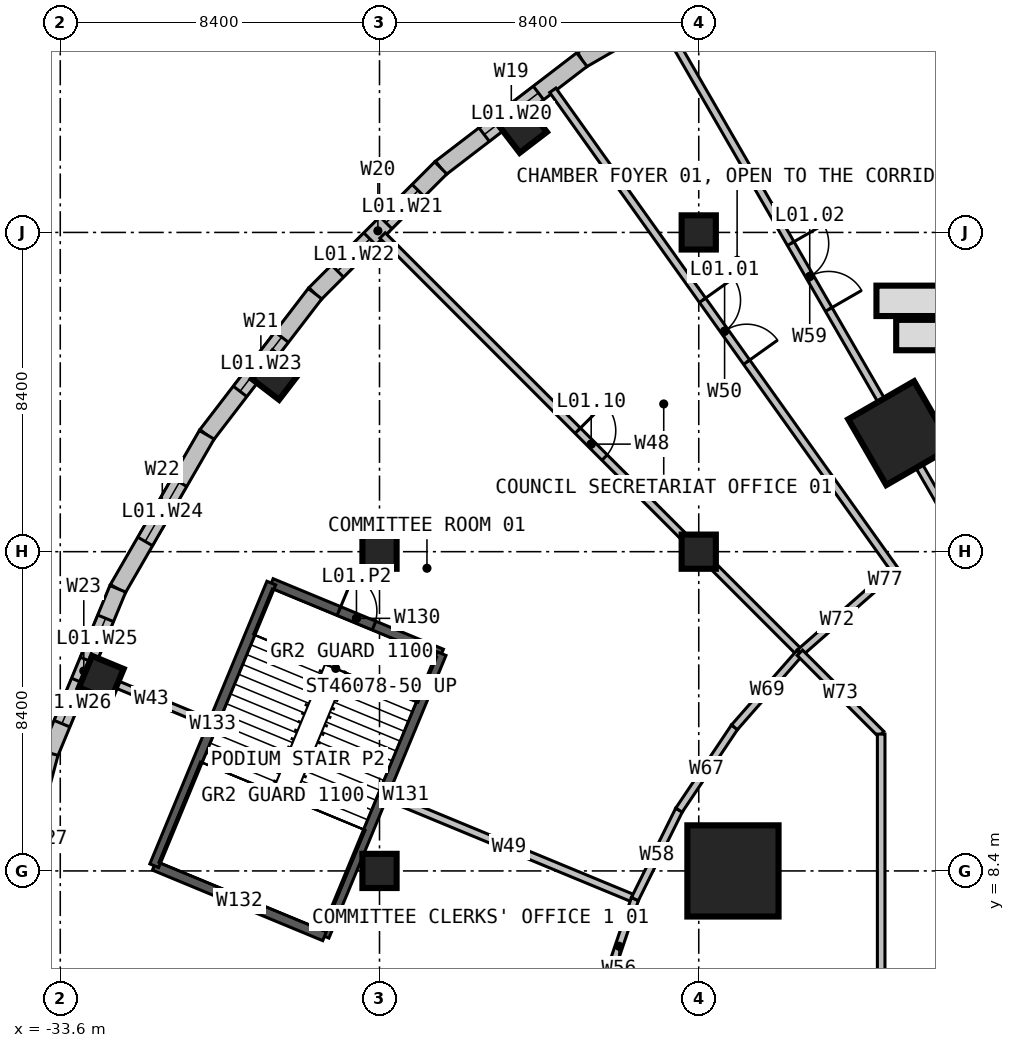
"""IFC4 building model, lengths in metres.
Left out: names, types, materials, properties, quantities, classifications, styles, units other than length and angle.
Written with IfcOpenShell. Run it as: python <this file> out.ifc"""

import sys

from ifc_helpers import new_model, si_unit, direction, frame, frame_2d, origin, origin_2d, place, context, subcontext, project, spatial, rectangle, hollow_rectangle, extrude, element, fill, save


model = new_model("IFC4")
c1 = context("Model", 3, precision=1e-05, world=origin(), true_north=direction((0.0, 1.0)))
c2 = subcontext(c1, "Body", "Model", "MODEL_VIEW")
j1 = project(units=[si_unit("LENGTHUNIT", "METRE"), si_unit("PLANEANGLEUNIT", "RADIAN")], contexts=[c1])
p1 = place(None, origin())
s1 = spatial("IfcSite", under=j1, at=p1, CompositionType="ELEMENT")
p2 = place(p1, origin())
s2 = spatial("IfcBuilding", under=s1, at=p2, CompositionType="ELEMENT")
p3 = place(p2, frame((0.0, 0.0, 6.0)))
s3 = spatial("IfcBuildingStorey", under=s2, at=p3, CompositionType="ELEMENT", Elevation=6.0)
for number, where, z_axis, x_axis in (
    (1, (-25.2, 8.4, 0.0), (0.0, 0.0, 1.0), (1.0, 0.0, 0.0)),
    (2, (-25.2, 16.8, 0.0), (0.0, 0.0, 1.0), (1.0, 0.0, 0.0)),
):
    element("IfcColumn", number, at=place(p3, frame(where, z_axis=z_axis, x_axis=x_axis)), inside=s3, PredefinedType="COLUMN", context=c2, shape_type="SweptSolid", body=[
        extrude(rectangle(XDim=0.9, YDim=0.9, at=origin_2d()), origin(), (0.0, 0.0, 1.0), 5.0),
    ])
p4 = place(p3, frame((-15.9, 8.4, 0.0), z_axis=(0.0, 0.0, 1.0), x_axis=(1.0, 0.0, 0.0)))
e3 = element("IfcColumn", 3, at=p4, inside=s3, PredefinedType="COLUMN", context=c2, shape_type="SweptSolid", body=[
    extrude(rectangle(XDim=2.4, YDim=2.4, at=origin_2d()), origin(), (0.0, 0.0, 1.0), 5.0),
])
for number, where, z_axis, x_axis in (
    (4, (-16.8, 16.8, 0.0), (0.0, 0.0, 1.0), (1.0, 0.0, 0.0)),
    (5, (-16.8, 25.2, 0.0), (0.0, 0.0, 1.0), (1.0, 0.0, 0.0)),
    (6, (-21.428, 27.926, 0.0), (0.0, 0.0, 1.0), (-0.609, 0.793, 0.0)),
    (7, (-27.926, 21.428, 0.0), (0.0, 0.0, 1.0), (-0.793, 0.609, 0.0)),
    (8, (-32.521, 13.47, 0.0), (0.0, 0.0, 1.0), (-0.924, 0.383, 0.0)),
):
    element("IfcColumn", number, at=place(p3, frame(where, z_axis=z_axis, x_axis=x_axis)), inside=s3, PredefinedType="COLUMN", context=c2, shape_type="SweptSolid", body=[
        extrude(rectangle(XDim=0.9, YDim=0.9, at=origin_2d()), origin(), (0.0, 0.0, 1.0), 5.0),
    ])
p5 = place(p3, frame((-11.5, 19.919, 0.0), z_axis=(0.0, 0.0, 1.0), x_axis=(-0.5, 0.866025403784, 0.0)))
e9 = element("IfcColumn", 9, at=p5, inside=s3, PredefinedType="COLUMN", context=c2, shape_type="SweptSolid", body=[
    extrude(hollow_rectangle(XDim=2.0, YDim=2.0, WallThickness=0.24, at=origin_2d()), origin(), (0.0, 0.0, 1.0), 5.0),
])
p6 = place(p3, frame((-15.823, 32.086, 0.0), z_axis=(0.0, 0.0, 1.0), x_axis=(-0.866012687223, -0.500022025083, 0.0)))
e10 = element("IfcWall", 10, at=p6, inside=s3, PredefinedType="SOLIDWALL", context=c2, shape_type="SweptSolid", body=[
    extrude(rectangle(XDim=4.679, YDim=0.45, at=frame_2d((2.34, 0.0))), origin(), (0.0, 0.0, 1.0), 4.7),
])
p7 = place(p6, frame((0.84, 0.0, 0.9)))
e11 = element("IfcOpeningElement", 11, at=p7, cuts=e10, PredefinedType="OPENING", context=c2, shape_type="SweptSolid", body=[
    extrude(rectangle(XDim=1.2, YDim=2.4, at=frame_2d((0.6, 1.2))), frame((0.0, 0.235, 0.0), z_axis=(0.0, -1.0, 0.0), x_axis=(1.0, 0.0, 0.0)), (0.0, 0.0, 1.0), 0.47),
])
p8 = place(p6, frame((2.64, 0.0, 0.9)))
e12 = element("IfcOpeningElement", 12, at=p8, cuts=e10, PredefinedType="OPENING", context=c2, shape_type="SweptSolid", body=[
    extrude(rectangle(XDim=1.2, YDim=2.4, at=frame_2d((0.6, 1.2))), frame((0.0, 0.235, 0.0), z_axis=(0.0, -1.0, 0.0), x_axis=(1.0, 0.0, 0.0)), (0.0, 0.0, 1.0), 0.47),
])
p9 = place(p3, frame((-19.875, 29.746, 0.0), z_axis=(0.0, 0.0, 1.0), x_axis=(-0.79334682721, -0.608769916927, 0.0)))
e13 = element("IfcWall", 13, at=p9, inside=s3, PredefinedType="SOLIDWALL", context=c2, shape_type="SweptSolid", body=[
    extrude(rectangle(XDim=4.68, YDim=0.45, at=frame_2d((2.34, 0.0))), origin(), (0.0, 0.0, 1.0), 4.7),
])
p10 = place(p9, frame((1.44, 0.0, 0.9)))
e14 = element("IfcOpeningElement", 14, at=p10, cuts=e13, PredefinedType="OPENING", context=c2, shape_type="SweptSolid", body=[
    extrude(rectangle(XDim=1.8, YDim=2.4, at=frame_2d((0.9, 1.2))), frame((0.0, 0.235, 0.0), z_axis=(0.0, -1.0, 0.0), x_axis=(1.0, 0.0, 0.0)), (0.0, 0.0, 1.0), 0.47),
])
p11 = place(p3, frame((-23.588, 26.897, 0.0), z_axis=(0.0, 0.0, 1.0), x_axis=(-0.707106781187, -0.707106781187, 0.0)))
e15 = element("IfcWall", 15, at=p11, inside=s3, PredefinedType="SOLIDWALL", context=c2, shape_type="SweptSolid", body=[
    extrude(rectangle(XDim=4.679, YDim=0.45, at=frame_2d((2.34, 0.0))), origin(), (0.0, 0.0, 1.0), 4.7),
])
p12 = place(p11, frame((0.84, 0.0, 0.9)))
e16 = element("IfcOpeningElement", 16, at=p12, cuts=e15, PredefinedType="OPENING", context=c2, shape_type="SweptSolid", body=[
    extrude(rectangle(XDim=1.2, YDim=2.4, at=frame_2d((0.6, 1.2))), frame((0.0, 0.235, 0.0), z_axis=(0.0, -1.0, 0.0), x_axis=(1.0, 0.0, 0.0)), (0.0, 0.0, 1.0), 0.47),
])
p13 = place(p11, frame((2.64, 0.0, 0.9)))
e17 = element("IfcOpeningElement", 17, at=p13, cuts=e15, PredefinedType="OPENING", context=c2, shape_type="SweptSolid", body=[
    extrude(rectangle(XDim=1.2, YDim=2.4, at=frame_2d((0.6, 1.2))), frame((0.0, 0.235, 0.0), z_axis=(0.0, -1.0, 0.0), x_axis=(1.0, 0.0, 0.0)), (0.0, 0.0, 1.0), 0.47),
])
p14 = place(p3, frame((-26.897, 23.588, 0.0), z_axis=(0.0, 0.0, 1.0), x_axis=(-0.608769916927, -0.79334682721, 0.0)))
e18 = element("IfcWall", 18, at=p14, inside=s3, PredefinedType="SOLIDWALL", context=c2, shape_type="SweptSolid", body=[
    extrude(rectangle(XDim=4.68, YDim=0.45, at=frame_2d((2.34, 0.0))), origin(), (0.0, 0.0, 1.0), 4.7),
])
p15 = place(p14, frame((1.44, 0.0, 0.9)))
e19 = element("IfcOpeningElement", 19, at=p15, cuts=e18, PredefinedType="OPENING", context=c2, shape_type="SweptSolid", body=[
    extrude(rectangle(XDim=1.8, YDim=2.4, at=frame_2d((0.9, 1.2))), frame((0.0, 0.235, 0.0), z_axis=(0.0, -1.0, 0.0), x_axis=(1.0, 0.0, 0.0)), (0.0, 0.0, 1.0), 0.47),
])
p16 = place(p3, frame((-29.746, 19.875, 0.0), z_axis=(0.0, 0.0, 1.0), x_axis=(-0.500022025083, -0.866012687223, 0.0)))
e20 = element("IfcWall", 20, at=p16, inside=s3, PredefinedType="SOLIDWALL", context=c2, shape_type="SweptSolid", body=[
    extrude(rectangle(XDim=4.679, YDim=0.45, at=frame_2d((2.34, 0.0))), origin(), (0.0, 0.0, 1.0), 4.7),
])
p17 = place(p16, frame((1.44, 0.0, 0.9)))
e21 = element("IfcOpeningElement", 21, at=p17, cuts=e20, PredefinedType="OPENING", context=c2, shape_type="SweptSolid", body=[
    extrude(rectangle(XDim=1.8, YDim=2.4, at=frame_2d((0.9, 1.2))), frame((0.0, 0.235, 0.0), z_axis=(0.0, -1.0, 0.0), x_axis=(1.0, 0.0, 0.0)), (0.0, 0.0, 1.0), 0.47),
])
p18 = place(p3, frame((-32.086, 15.823, 0.0), z_axis=(0.0, 0.0, 1.0), x_axis=(-0.382669718086, -0.923885213032, 0.0)))
e22 = element("IfcWall", 22, at=p18, inside=s3, PredefinedType="SOLIDWALL", context=c2, shape_type="SweptSolid", body=[
    extrude(rectangle(XDim=4.68, YDim=0.45, at=frame_2d((2.34, 0.0))), origin(), (0.0, 0.0, 1.0), 4.7),
])
p19 = place(p18, frame((0.84, 0.0, 0.9)))
e23 = element("IfcOpeningElement", 23, at=p19, cuts=e22, PredefinedType="OPENING", context=c2, shape_type="SweptSolid", body=[
    extrude(rectangle(XDim=1.2, YDim=2.4, at=frame_2d((0.6, 1.2))), frame((0.0, 0.235, 0.0), z_axis=(0.0, -1.0, 0.0), x_axis=(1.0, 0.0, 0.0)), (0.0, 0.0, 1.0), 0.47),
])
p20 = place(p18, frame((2.64, 0.0, 0.9)))
e24 = element("IfcOpeningElement", 24, at=p20, cuts=e22, PredefinedType="OPENING", context=c2, shape_type="SweptSolid", body=[
    extrude(rectangle(XDim=1.2, YDim=2.4, at=frame_2d((0.6, 1.2))), frame((0.0, 0.235, 0.0), z_axis=(0.0, -1.0, 0.0), x_axis=(1.0, 0.0, 0.0)), (0.0, 0.0, 1.0), 0.47),
])
p21 = place(p3, frame((-33.876, 11.5, 0.0), z_axis=(0.0, 0.0, 1.0), x_axis=(-0.258815185258, -0.965926860523, 0.0)))
e25 = element("IfcWall", 25, at=p21, inside=s3, PredefinedType="SOLIDWALL", context=c2, shape_type="SweptSolid", body=[
    extrude(rectangle(XDim=4.68, YDim=0.45, at=frame_2d((2.34, 0.0))), origin(), (0.0, 0.0, 1.0), 4.7),
])
p22 = place(p21, frame((1.44, 0.0, 0.9)))
e26 = element("IfcOpeningElement", 26, at=p22, cuts=e25, PredefinedType="OPENING", context=c2, shape_type="SweptSolid", body=[
    extrude(rectangle(XDim=1.8, YDim=2.4, at=frame_2d((0.9, 1.2))), frame((0.0, 0.235, 0.0), z_axis=(0.0, -1.0, 0.0), x_axis=(1.0, 0.0, 0.0)), (0.0, 0.0, 1.0), 0.47),
])
p23 = place(p3, frame((-28.047, 15.974, 0.0), z_axis=(0.0, 0.0, 1.0), x_axis=(0.923862828997, -0.382723755727, 0.0)))
e27 = element("IfcWall", 27, at=p23, inside=s3, PredefinedType="SOLIDWALL", context=c2, shape_type="SweptSolid", body=[
    extrude(rectangle(XDim=4.85, YDim=0.25, at=frame_2d((2.425, 0.0))), origin(), (0.0, 0.0, 1.0), 5.0),
])
p24 = place(p23, frame((1.925, 0.0, 0.0)))
e28 = element("IfcOpeningElement", 28, at=p24, cuts=e27, PredefinedType="OPENING", context=c2, shape_type="SweptSolid", body=[
    extrude(rectangle(XDim=1.0, YDim=2.2, at=frame_2d((0.5, 1.1))), frame((0.0, 0.135, 0.0), z_axis=(0.0, -1.0, 0.0), x_axis=(1.0, 0.0, 0.0)), (0.0, 0.0, 1.0), 0.27),
])
p25 = place(p3, frame((-23.566, 14.118, 0.0), z_axis=(0.0, 0.0, 1.0), x_axis=(-0.382689294869, -0.923877104161, 0.0)))
e29 = element("IfcWall", 29, at=p25, inside=s3, PredefinedType="SOLIDWALL", context=c2, shape_type="SweptSolid", body=[
    extrude(rectangle(XDim=8.05, YDim=0.25, at=frame_2d((4.025, 0.0))), origin(), (0.0, 0.0, 1.0), 5.0),
])
p26 = place(p3, frame((-26.647, 6.681, 0.0), z_axis=(0.0, 0.0, 1.0), x_axis=(-0.923880627248, 0.382680789426, 0.0)))
e30 = element("IfcWall", 30, at=p26, inside=s3, PredefinedType="SOLIDWALL", context=c2, shape_type="SweptSolid", body=[
    extrude(rectangle(XDim=4.85, YDim=0.25, at=frame_2d((2.425, 0.0))), origin(), (0.0, 0.0, 1.0), 5.0),
])
p27 = place(p3, frame((-31.127, 8.537, 0.0), z_axis=(0.0, 0.0, 1.0), x_axis=(0.382678572144, 0.923881545666, 0.0)))
e31 = element("IfcWall", 31, at=p27, inside=s3, PredefinedType="SOLIDWALL", context=c2, shape_type="SweptSolid", body=[
    extrude(rectangle(XDim=8.05, YDim=0.25, at=frame_2d((4.025, 0.0))), origin(), (0.0, 0.0, 1.0), 5.0),
])
p28 = place(p3, frame((-32.82, 13.6, 0.0), z_axis=(0.0, 0.0, 1.0), x_axis=(0.924077050269, -0.382206233813, 0.0)))
e32 = element("IfcWall", 32, at=p28, inside=s3, PredefinedType="PARTITIONING", context=c2, shape_type="SweptSolid", body=[
    extrude(rectangle(XDim=3.506, YDim=0.2, at=frame_2d((1.753, 0.0))), origin(), (0.0, 0.0, 1.0), 4.7),
])
p29 = place(p3, frame((-25.12, 25.12, 0.0), z_axis=(0.0, 0.0, 1.0), x_axis=(0.707106781187, -0.707106781187, 0.0)))
e33 = element("IfcWall", 33, at=p29, inside=s3, PredefinedType="PARTITIONING", context=c2, shape_type="SweptSolid", body=[
    extrude(rectangle(XDim=15.528, YDim=0.2, at=frame_2d((7.764, 0.0))), origin(), (0.0, 0.0, 1.0), 4.7),
])
p30 = place(p29, frame((7.264, 0.0, 0.0)))
e34 = element("IfcOpeningElement", 34, at=p30, cuts=e33, PredefinedType="OPENING", context=c2, shape_type="SweptSolid", body=[
    extrude(rectangle(XDim=1.0, YDim=2.2, at=frame_2d((0.5, 1.1))), frame((0.0, 0.11, 0.0), z_axis=(0.0, -1.0, 0.0), x_axis=(1.0, 0.0, 0.0)), (0.0, 0.0, 1.0), 0.22),
])
p31 = place(p3, frame((-25.1, 10.4, 0.0), z_axis=(0.0, 0.0, 1.0), x_axis=(0.923985694571, -0.382427033861, 0.0)))
e35 = element("IfcWall", 35, at=p31, inside=s3, PredefinedType="PARTITIONING", context=c2, shape_type="SweptSolid", body=[
    extrude(rectangle(XDim=7.165, YDim=0.2, at=frame_2d((3.583, 0.0))), origin(), (0.0, 0.0, 1.0), 4.7),
])
p32 = place(p3, frame((-20.64, 28.94, 0.0), z_axis=(0.0, 0.0, 1.0), x_axis=(0.580502370217, -0.814258557322, 0.0)))
e36 = element("IfcWall", 36, at=p32, inside=s3, PredefinedType="PARTITIONING", context=c2, shape_type="SweptSolid", body=[
    extrude(rectangle(XDim=15.572, YDim=0.2, at=frame_2d((7.786, 0.0))), origin(), (0.0, 0.0, 1.0), 4.7),
])
p33 = place(p32, frame((6.786, 0.0, 0.0)))
e37 = element("IfcOpeningElement", 37, at=p33, cuts=e36, PredefinedType="OPENING", context=c2, shape_type="SweptSolid", body=[
    extrude(rectangle(XDim=2.0, YDim=2.4, at=frame_2d((1.0, 1.2))), frame((0.0, 0.11, 0.0), z_axis=(0.0, -1.0, 0.0), x_axis=(1.0, 0.0, 0.0)), (0.0, 0.0, 1.0), 0.22),
])
p34 = place(p3, frame((-19.32, 5.18, 0.0), z_axis=(0.0, 0.0, 1.0), x_axis=(0.320839411875, 0.947133608203, 0.0)))
e38 = element("IfcWall", 38, at=p34, inside=s3, PredefinedType="PARTITIONING", context=c2, shape_type="SweptSolid", body=[
    extrude(rectangle(XDim=2.618, YDim=0.2, at=frame_2d((1.309, 0.0))), origin(), (0.0, 0.0, 1.0), 4.7),
])
p35 = place(p3, frame((-18.48, 7.66, 0.0), z_axis=(0.0, 0.0, 1.0), x_axis=(0.444107479291, 0.895973519049, 0.0)))
e39 = element("IfcWall", 39, at=p35, inside=s3, PredefinedType="PARTITIONING", context=c2, shape_type="SweptSolid", body=[
    extrude(rectangle(XDim=2.612, YDim=0.2, at=frame_2d((1.306, 0.0))), origin(), (0.0, 0.0, 1.0), 4.7),
])
p36 = place(p3, frame((-17.76, 30.76, 0.0), z_axis=(0.0, 0.0, 1.0), x_axis=(0.500022035744, -0.866012681068, 0.0)))
e40 = element("IfcWall", 40, at=p36, inside=s3, PredefinedType="PARTITIONING", context=c2, shape_type="SweptSolid", body=[
    extrude(rectangle(XDim=15.519, YDim=0.2, at=frame_2d((7.76, 0.0))), origin(), (0.0, 0.0, 1.0), 4.7),
])
p37 = place(p36, frame((6.76, 0.0, 0.0)))
e41 = element("IfcOpeningElement", 41, at=p37, cuts=e40, PredefinedType="OPENING", context=c2, shape_type="SweptSolid", body=[
    extrude(rectangle(XDim=2.0, YDim=2.4, at=frame_2d((1.0, 1.2))), frame((0.0, 0.11, 0.0), z_axis=(0.0, -1.0, 0.0), x_axis=(1.0, 0.0, 0.0)), (0.0, 0.0, 1.0), 0.22),
])
p38 = place(p3, frame((-17.32, 10.0, 0.0), z_axis=(0.0, 0.0, 1.0), x_axis=(0.556459812229, 0.83087452565, 0.0)))
e42 = element("IfcWall", 42, at=p38, inside=s3, PredefinedType="PARTITIONING", context=c2, shape_type="SweptSolid", body=[
    extrude(rectangle(XDim=2.624, YDim=0.2, at=frame_2d((1.312, 0.0))), origin(), (0.0, 0.0, 1.0), 4.7),
])
for number, where, z_axis, x_axis in (
    (43, (-15.86, 12.18, 0.0), (0.0, 0.0, 1.0), (0.66, 0.752, 0.0)),
    (44, (-14.14, 14.14, 0.0), (0.0, 0.0, 1.0), (0.752, 0.66, 0.0)),
):
    element("IfcWall", number, at=place(p3, frame(where, z_axis=z_axis, x_axis=x_axis)), inside=s3, PredefinedType="PARTITIONING", context=c2, shape_type="SweptSolid", body=[
        extrude(rectangle(XDim=2.608, YDim=0.2, at=frame_2d((1.304, 0.0))), origin(), (0.0, 0.0, 1.0), 4.7),
    ])
p39 = place(p3, frame((-14.14, 14.14, 0.0), z_axis=(0.0, 0.0, 1.0), x_axis=(0.707106781187, -0.707106781187, 0.0)))
e45 = element("IfcWall", 45, at=p39, inside=s3, PredefinedType="PARTITIONING", context=c2, shape_type="SweptSolid", body=[
    extrude(rectangle(XDim=3.026, YDim=0.2, at=frame_2d((1.513, 0.0))), origin(), (0.0, 0.0, 1.0), 4.7),
])
p40 = place(p3, frame((-12.18, 15.86, 0.0), z_axis=(0.0, 0.0, 1.0), x_axis=(0.823201613759, 0.567749155089, 0.0)))
e46 = element("IfcWall", 46, at=p40, inside=s3, PredefinedType="PARTITIONING", context=c2, shape_type="SweptSolid", body=[
    extrude(rectangle(XDim=0.704, YDim=0.2, at=frame_2d((0.352, 0.0))), origin(), (0.0, 0.0, 1.0), 4.7),
])
p41 = place(p3, frame((-12.0, 12.0, 0.0), z_axis=(0.0, 0.0, 1.0), x_axis=(0.0, -1.0, 0.0)))
e47 = element("IfcWall", 47, at=p41, inside=s3, PredefinedType="PARTITIONING", context=c2, shape_type="SweptSolid", body=[
    extrude(rectangle(XDim=24.0, YDim=0.2, at=frame_2d((12.0, 0.0))), origin(), (0.0, 0.0, 1.0), 4.7),
])
p42 = place(p10, origin())
e48 = element("IfcWindow", 48, at=p42, inside=s3, PartitioningType="SINGLE_PANEL", PredefinedType="WINDOW", context=c2, shape_type="SweptSolid", body=[
    extrude(rectangle(XDim=1.8, YDim=2.4, at=frame_2d((0.9, 1.2))), frame((0.0, 0.03, 0.0), z_axis=(0.0, -1.0, 0.0), x_axis=(1.0, 0.0, 0.0)), (0.0, 0.0, 1.0), 0.06),
])
fill(e14, e48)
p43 = place(p12, origin())
e49 = element("IfcWindow", 49, at=p43, inside=s3, PartitioningType="SINGLE_PANEL", PredefinedType="WINDOW", context=c2, shape_type="SweptSolid", body=[
    extrude(rectangle(XDim=1.2, YDim=2.4, at=frame_2d((0.6, 1.2))), frame((0.0, 0.03, 0.0), z_axis=(0.0, -1.0, 0.0), x_axis=(1.0, 0.0, 0.0)), (0.0, 0.0, 1.0), 0.06),
])
fill(e16, e49)
p44 = place(p13, origin())
e50 = element("IfcWindow", 50, at=p44, inside=s3, PartitioningType="SINGLE_PANEL", PredefinedType="WINDOW", context=c2, shape_type="SweptSolid", body=[
    extrude(rectangle(XDim=1.2, YDim=2.4, at=frame_2d((0.6, 1.2))), frame((0.0, 0.03, 0.0), z_axis=(0.0, -1.0, 0.0), x_axis=(1.0, 0.0, 0.0)), (0.0, 0.0, 1.0), 0.06),
])
fill(e17, e50)
p45 = place(p15, origin())
e51 = element("IfcWindow", 51, at=p45, inside=s3, PartitioningType="SINGLE_PANEL", PredefinedType="WINDOW", context=c2, shape_type="SweptSolid", body=[
    extrude(rectangle(XDim=1.8, YDim=2.4, at=frame_2d((0.9, 1.2))), frame((0.0, 0.03, 0.0), z_axis=(0.0, -1.0, 0.0), x_axis=(1.0, 0.0, 0.0)), (0.0, 0.0, 1.0), 0.06),
])
fill(e19, e51)
p46 = place(p17, origin())
e52 = element("IfcWindow", 52, at=p46, inside=s3, PartitioningType="SINGLE_PANEL", PredefinedType="WINDOW", context=c2, shape_type="SweptSolid", body=[
    extrude(rectangle(XDim=1.8, YDim=2.4, at=frame_2d((0.9, 1.2))), frame((0.0, 0.03, 0.0), z_axis=(0.0, -1.0, 0.0), x_axis=(1.0, 0.0, 0.0)), (0.0, 0.0, 1.0), 0.06),
])
fill(e21, e52)
p47 = place(p19, origin())
e53 = element("IfcWindow", 53, at=p47, inside=s3, PartitioningType="SINGLE_PANEL", PredefinedType="WINDOW", context=c2, shape_type="SweptSolid", body=[
    extrude(rectangle(XDim=1.2, YDim=2.4, at=frame_2d((0.6, 1.2))), frame((0.0, 0.03, 0.0), z_axis=(0.0, -1.0, 0.0), x_axis=(1.0, 0.0, 0.0)), (0.0, 0.0, 1.0), 0.06),
])
fill(e23, e53)
p48 = place(p20, origin())
e54 = element("IfcWindow", 54, at=p48, inside=s3, PartitioningType="SINGLE_PANEL", PredefinedType="WINDOW", context=c2, shape_type="SweptSolid", body=[
    extrude(rectangle(XDim=1.2, YDim=2.4, at=frame_2d((0.6, 1.2))), frame((0.0, 0.03, 0.0), z_axis=(0.0, -1.0, 0.0), x_axis=(1.0, 0.0, 0.0)), (0.0, 0.0, 1.0), 0.06),
])
fill(e24, e54)
p49 = place(p24, origin())
e55 = element("IfcDoor", 55, at=p49, inside=s3, OperationType="SINGLE_SWING_LEFT", PredefinedType="DOOR", context=c2, shape_type="SweptSolid", body=[
    extrude(rectangle(XDim=1.0, YDim=2.2, at=frame_2d((0.5, 1.1))), frame((0.0, 0.025, 0.0), z_axis=(0.0, -1.0, 0.0), x_axis=(1.0, 0.0, 0.0)), (0.0, 0.0, 1.0), 0.05),
])
fill(e28, e55)
p50 = place(p33, origin())
e56 = element("IfcDoor", 56, at=p50, inside=s3, OperationType="DOUBLE_DOOR_SINGLE_SWING", PredefinedType="DOOR", context=c2, shape_type="SweptSolid", body=[
    extrude(rectangle(XDim=2.0, YDim=2.4, at=frame_2d((1.0, 1.2))), frame((0.0, 0.025, 0.0), z_axis=(0.0, -1.0, 0.0), x_axis=(1.0, 0.0, 0.0)), (0.0, 0.0, 1.0), 0.05),
])
fill(e37, e56)
p51 = place(p37, origin())
e57 = element("IfcDoor", 57, at=p51, inside=s3, OperationType="DOUBLE_DOOR_SINGLE_SWING", PredefinedType="DOOR", context=c2, shape_type="SweptSolid", body=[
    extrude(rectangle(XDim=2.0, YDim=2.4, at=frame_2d((1.0, 1.2))), frame((0.0, 0.025, 0.0), z_axis=(0.0, -1.0, 0.0), x_axis=(1.0, 0.0, 0.0)), (0.0, 0.0, 1.0), 0.05),
])
fill(e41, e57)
p52 = place(p30, origin())
e58 = element("IfcDoor", 58, at=p52, inside=s3, OperationType="SINGLE_SWING_LEFT", PredefinedType="DOOR", context=c2, shape_type="SweptSolid", body=[
    extrude(rectangle(XDim=1.0, YDim=2.2, at=frame_2d((0.5, 1.1))), frame((0.0, 0.025, 0.0), z_axis=(0.0, -1.0, 0.0), x_axis=(1.0, 0.0, 0.0)), (0.0, 0.0, 1.0), 0.05),
])
fill(e34, e58)
save(model, sys.argv[1])
